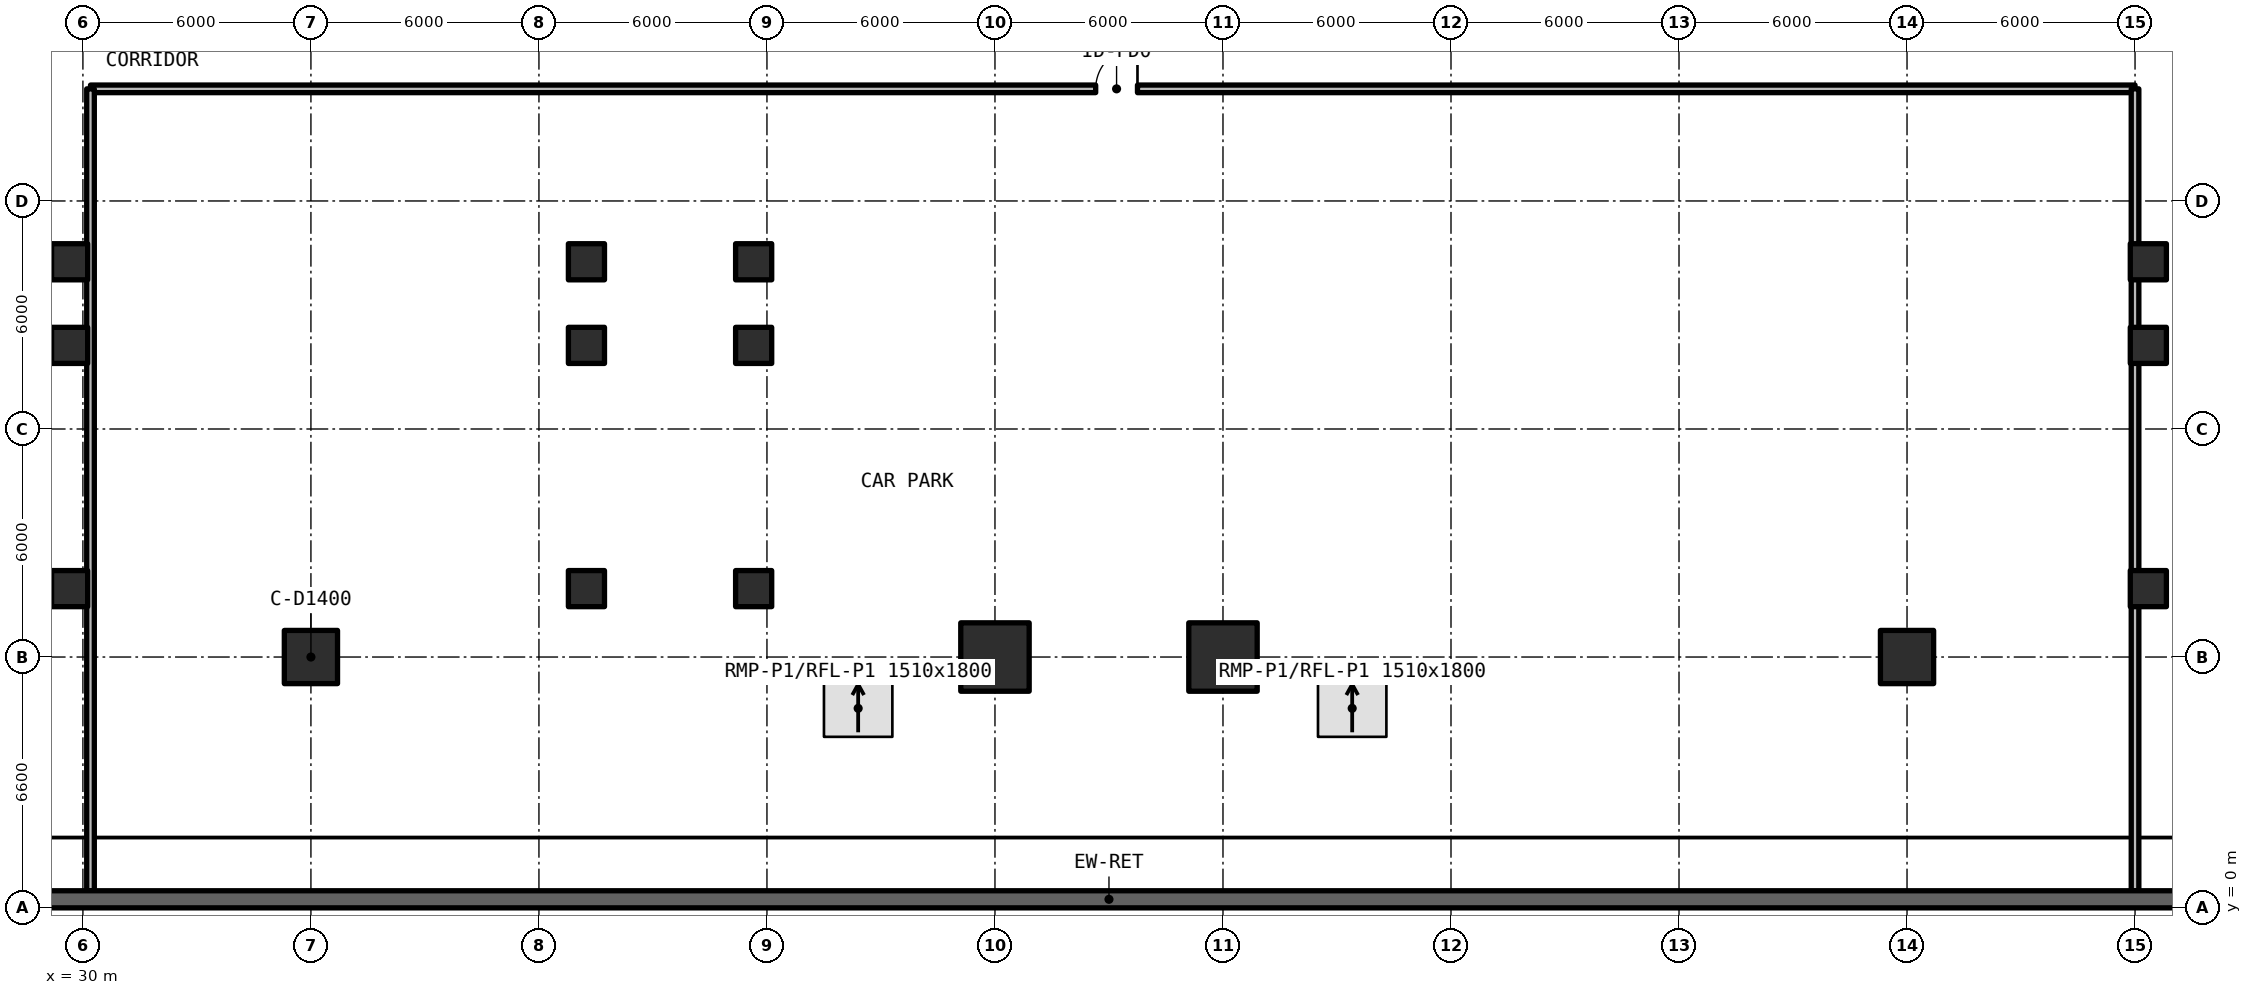
"""IFC4 building model, lengths in metres.
Left out: names, types, materials, properties, quantities, classifications, styles, units other than length and angle.
Written with IfcOpenShell. Run it as: python <this file> out.ifc"""

import sys

from ifc_helpers import new_model, si_unit, direction, frame, frame_2d, origin, origin_2d, place, context, subcontext, project, spatial, rectangle, circle, extrude, element, fill, save


model = new_model("IFC4")
c1 = context("Model", 3, precision=1e-05, world=origin(), true_north=direction((0.0, 1.0)))
c2 = subcontext(c1, "Body", "Model", "MODEL_VIEW")
j1 = project(units=[si_unit("LENGTHUNIT", "METRE"), si_unit("PLANEANGLEUNIT", "RADIAN")], contexts=[c1])
p1 = place(None, origin())
s1 = spatial("IfcSite", under=j1, at=p1, CompositionType="ELEMENT")
p2 = place(p1, origin())
s2 = spatial("IfcBuilding", under=s1, at=p2, CompositionType="ELEMENT")
p3 = place(p2, frame((0.0, 0.0, -9.24)))
s3 = spatial("IfcBuildingStorey", under=s2, at=p3, CompositionType="ELEMENT", Elevation=-9.24)
p4 = place(p3, frame((36.0, 6.6, 0.0), z_axis=(0.0, 0.0, 1.0), x_axis=(1.0, 0.0, 0.0)))
e1 = element("IfcColumn", 1, at=p4, inside=s3, PredefinedType="COLUMN", context=c2, shape_type="SweptSolid", body=[
    extrude(circle(Radius=0.7, at=origin_2d()), origin(), (0.0, 0.0, 1.0), 4.62),
])
for number, where, z_axis, x_axis in (
    (2, (54.0, 6.6, 0.0), (0.0, 0.0, 1.0), (1.0, 0.0, 0.0)),
    (3, (60.0, 6.6, 0.0), (0.0, 0.0, 1.0), (1.0, 0.0, 0.0)),
):
    element("IfcColumn", number, at=place(p3, frame(where, z_axis=z_axis, x_axis=x_axis)), inside=s3, PredefinedType="COLUMN", context=c2, shape_type="SweptSolid", body=[
        extrude(rectangle(XDim=1.8, YDim=1.8, at=origin_2d()), origin(), (0.0, 0.0, 1.0), 4.62),
    ])
p5 = place(p3, frame((78.0, 6.6, 0.0), z_axis=(0.0, 0.0, 1.0), x_axis=(1.0, 0.0, 0.0)))
e4 = element("IfcColumn", 4, at=p5, inside=s3, PredefinedType="COLUMN", context=c2, shape_type="SweptSolid", body=[
    extrude(circle(Radius=0.7, at=origin_2d()), origin(), (0.0, 0.0, 1.0), 4.62),
])
for number, where, z_axis, x_axis in (
    (5, (29.65, 14.8, 0.0), (0.0, 0.0, 1.0), (1.0, 0.0, 0.0)),
    (6, (29.65, 8.4, 0.0), (0.0, 0.0, 1.0), (1.0, 0.0, 0.0)),
    (7, (29.65, 17.0, 0.0), (0.0, 0.0, 1.0), (1.0, 0.0, 0.0)),
    (8, (43.25, 14.8, 0.0), (0.0, 0.0, 1.0), (1.0, 0.0, 0.0)),
    (9, (47.65, 14.8, 0.0), (0.0, 0.0, 1.0), (1.0, 0.0, 0.0)),
    (10, (43.25, 8.4, 0.0), (0.0, 0.0, 1.0), (1.0, 0.0, 0.0)),
    (11, (47.65, 8.4, 0.0), (0.0, 0.0, 1.0), (1.0, 0.0, 0.0)),
    (12, (47.65, 17.0, 0.0), (0.0, 0.0, 1.0), (1.0, 0.0, 0.0)),
    (13, (43.25, 17.0, 0.0), (0.0, 0.0, 1.0), (1.0, 0.0, 0.0)),
    (14, (84.35, 14.8, 0.0), (0.0, 0.0, 1.0), (1.0, 0.0, 0.0)),
    (15, (84.35, 8.4, 0.0), (0.0, 0.0, 1.0), (1.0, 0.0, 0.0)),
    (16, (84.35, 17.0, 0.0), (0.0, 0.0, 1.0), (1.0, 0.0, 0.0)),
):
    element("IfcColumn", number, at=place(p3, frame(where, z_axis=z_axis, x_axis=x_axis)), inside=s3, PredefinedType="COLUMN", context=c2, shape_type="SweptSolid", body=[
        extrude(rectangle(XDim=0.95, YDim=0.95, at=origin_2d()), origin(), (0.0, 0.0, 1.0), 4.62),
    ])
p6 = place(p3, frame((0.225, 0.225, 0.0), z_axis=(0.0, 0.0, 1.0), x_axis=(1.0, 0.0, 0.0)))
e17 = element("IfcWall", 17, at=p6, inside=s3, PredefinedType="USERDEFINED", context=c2, shape_type="SweptSolid", body=[
    extrude(rectangle(XDim=113.55, YDim=0.45, at=frame_2d((56.775, 0.0))), origin(), (0.0, 0.0, 1.0), 4.32),
])
p7 = place(p3, frame((30.2, 21.55, 0.0), z_axis=(0.0, 0.0, 1.0), x_axis=(1.0, 0.0, 0.0)))
e18 = element("IfcWall", 18, at=p7, inside=s3, PredefinedType="SOLIDWALL", context=c2, shape_type="SweptSolid", body=[
    extrude(rectangle(XDim=53.8, YDim=0.2, at=frame_2d((26.9, 0.0))), origin(), (0.0, 0.0, 1.0), 3.54),
])
p8 = place(p7, frame((26.45, 0.0, 0.0)))
e19 = element("IfcOpeningElement", 19, at=p8, cuts=e18, PredefinedType="OPENING", context=c2, shape_type="SweptSolid", body=[
    extrude(rectangle(XDim=1.1, YDim=2.15, at=frame_2d((0.55, 1.075))), frame((0.0, 0.11, 0.0), z_axis=(0.0, -1.0, 0.0), x_axis=(1.0, 0.0, 0.0)), (0.0, 0.0, 1.0), 0.22),
])
for number, where, z_axis, x_axis in (
    (20, (30.2, 0.45, 0.0), (0.0, 0.0, 1.0), (0.0, 1.0, 0.0)),
    (21, (84.0, 0.45, 0.0), (0.0, 0.0, 1.0), (0.0, 1.0, 0.0)),
):
    element("IfcWall", number, at=place(p3, frame(where, z_axis=z_axis, x_axis=x_axis)), inside=s3, PredefinedType="SOLIDWALL", context=c2, shape_type="SweptSolid", body=[
        extrude(rectangle(XDim=21.1, YDim=0.2, at=frame_2d((10.55, 0.0))), origin(), (0.0, 0.0, 1.0), 3.54),
    ])
p9 = place(p8, origin())
e22 = element("IfcDoor", 22, at=p9, inside=s3, OperationType="SINGLE_SWING_RIGHT", PredefinedType="DOOR", context=c2, shape_type="SweptSolid", body=[
    extrude(rectangle(XDim=1.1, YDim=2.15, at=frame_2d((0.55, 1.075))), frame((0.0, 0.025, 0.0), z_axis=(0.0, -1.0, 0.0), x_axis=(1.0, 0.0, 0.0)), (0.0, 0.0, 1.0), 0.05),
])
fill(e19, e22)
save(model, sys.argv[1])
